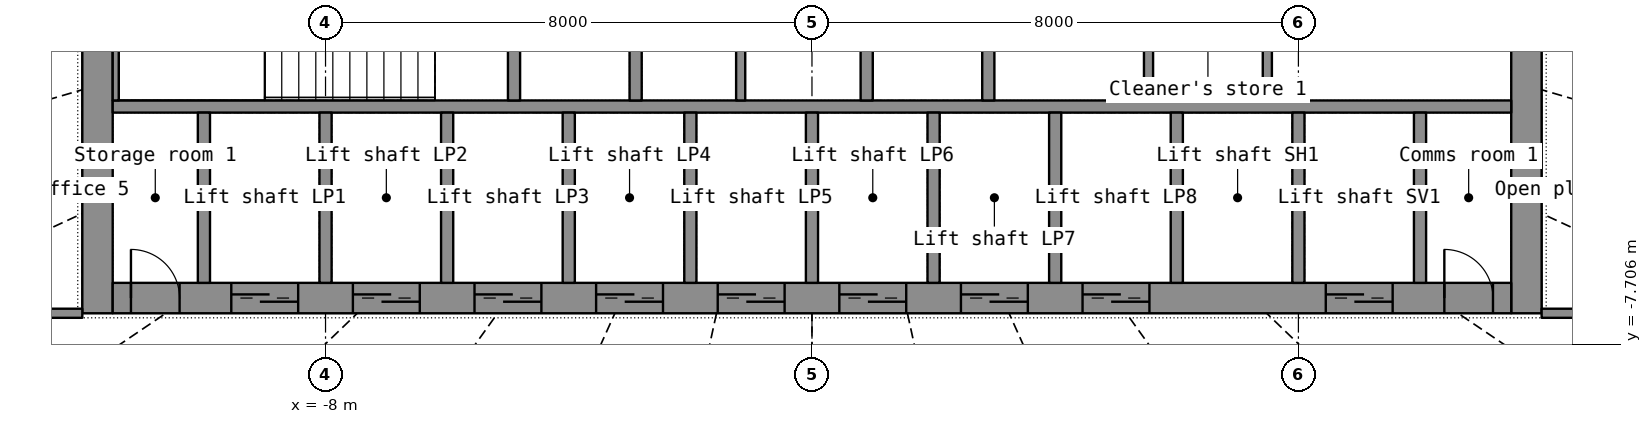
"""IFC4 building model, lengths in metres.
Left out: names, types, materials, properties, quantities, classifications, styles, units other than length and angle.
Written with IfcOpenShell. Run it as: python <this file> out.ifc"""

import sys

from ifc_helpers import new_model, si_unit, direction, frame, frame_2d, origin, place, context, subcontext, project, spatial, rectangle, extrude, element, fill, save


model = new_model("IFC4")
c1 = context("Model", 3, precision=1e-05, world=origin(), true_north=direction((0.0, 1.0)))
c2 = subcontext(c1, "Body", "Model", "MODEL_VIEW")
j1 = project(units=[si_unit("LENGTHUNIT", "METRE"), si_unit("PLANEANGLEUNIT", "RADIAN")], contexts=[c1])
p1 = place(None, origin())
s1 = spatial("IfcSite", under=j1, at=p1, CompositionType="ELEMENT")
p2 = place(p1, origin())
s2 = spatial("IfcBuilding", under=s1, at=p2, CompositionType="ELEMENT")
p3 = place(p2, frame((0.0, 0.0, 100.8)))
s3 = spatial("IfcBuildingStorey", under=s2, at=p3, CompositionType="ELEMENT", Elevation=100.8)
p4 = place(p3, frame((-11.75, -7.2, 0.0), z_axis=(0.0, 0.0, 1.0), x_axis=(0.0, 1.0, 0.0)))
e1 = element("IfcWall", 1, at=p4, inside=s3, PredefinedType="SHEAR", context=c2, shape_type="SweptSolid", body=[
    extrude(rectangle(XDim=14.4, YDim=0.5, at=frame_2d((7.2, 0.0))), origin(), (0.0, 0.0, 1.0), 3.3),
])
p5 = place(p4, frame((6.5, 0.0, 0.0)))
e2 = element("IfcOpeningElement", 2, at=p5, cuts=e1, PredefinedType="OPENING", context=c2, shape_type="SweptSolid", body=[
    extrude(rectangle(XDim=1.4, YDim=2.2, at=frame_2d((0.7, 1.1))), frame((0.0, 0.26, 0.0), z_axis=(0.0, -1.0, 0.0), x_axis=(1.0, 0.0, 0.0)), (0.0, 0.0, 1.0), 0.52),
])
p6 = place(p3, frame((11.75, -7.2, 0.0), z_axis=(0.0, 0.0, 1.0), x_axis=(0.0, 1.0, 0.0)))
e3 = element("IfcWall", 3, at=p6, inside=s3, PredefinedType="SHEAR", context=c2, shape_type="SweptSolid", body=[
    extrude(rectangle(XDim=14.4, YDim=0.5, at=frame_2d((7.2, 0.0))), origin(), (0.0, 0.0, 1.0), 3.3),
])
p7 = place(p6, frame((6.5, 0.0, 0.0)))
e4 = element("IfcOpeningElement", 4, at=p7, cuts=e3, PredefinedType="OPENING", context=c2, shape_type="SweptSolid", body=[
    extrude(rectangle(XDim=1.4, YDim=2.2, at=frame_2d((0.7, 1.1))), frame((0.0, 0.26, 0.0), z_axis=(0.0, -1.0, 0.0), x_axis=(1.0, 0.0, 0.0)), (0.0, 0.0, 1.0), 0.52),
])
p8 = place(p3, frame((-11.5, -6.95, 0.0), z_axis=(0.0, 0.0, 1.0), x_axis=(1.0, 0.0, 0.0)))
e5 = element("IfcWall", 5, at=p8, inside=s3, PredefinedType="SHEAR", context=c2, shape_type="SweptSolid", body=[
    extrude(rectangle(XDim=23.0, YDim=0.5, at=frame_2d((11.5, 0.0))), origin(), (0.0, 0.0, 1.0), 3.3),
])
p9 = place(p8, frame((1.95, 0.0, 0.0)))
e6 = element("IfcOpeningElement", 6, at=p9, cuts=e5, PredefinedType="OPENING", context=c2, shape_type="SweptSolid", body=[
    extrude(rectangle(XDim=1.1, YDim=2.2, at=frame_2d((0.55, 1.1))), frame((0.0, 0.26, 0.0), z_axis=(0.0, -1.0, 0.0), x_axis=(1.0, 0.0, 0.0)), (0.0, 0.0, 1.0), 0.52),
])
p10 = place(p8, frame((3.95, 0.0, 0.0)))
e7 = element("IfcOpeningElement", 7, at=p10, cuts=e5, PredefinedType="OPENING", context=c2, shape_type="SweptSolid", body=[
    extrude(rectangle(XDim=1.1, YDim=2.2, at=frame_2d((0.55, 1.1))), frame((0.0, 0.26, 0.0), z_axis=(0.0, -1.0, 0.0), x_axis=(1.0, 0.0, 0.0)), (0.0, 0.0, 1.0), 0.52),
])
p11 = place(p8, frame((5.95, 0.0, 0.0)))
e8 = element("IfcOpeningElement", 8, at=p11, cuts=e5, PredefinedType="OPENING", context=c2, shape_type="SweptSolid", body=[
    extrude(rectangle(XDim=1.1, YDim=2.2, at=frame_2d((0.55, 1.1))), frame((0.0, 0.26, 0.0), z_axis=(0.0, -1.0, 0.0), x_axis=(1.0, 0.0, 0.0)), (0.0, 0.0, 1.0), 0.52),
])
p12 = place(p8, frame((7.95, 0.0, 0.0)))
e9 = element("IfcOpeningElement", 9, at=p12, cuts=e5, PredefinedType="OPENING", context=c2, shape_type="SweptSolid", body=[
    extrude(rectangle(XDim=1.1, YDim=2.2, at=frame_2d((0.55, 1.1))), frame((0.0, 0.26, 0.0), z_axis=(0.0, -1.0, 0.0), x_axis=(1.0, 0.0, 0.0)), (0.0, 0.0, 1.0), 0.52),
])
p13 = place(p8, frame((9.95, 0.0, 0.0)))
e10 = element("IfcOpeningElement", 10, at=p13, cuts=e5, PredefinedType="OPENING", context=c2, shape_type="SweptSolid", body=[
    extrude(rectangle(XDim=1.1, YDim=2.2, at=frame_2d((0.55, 1.1))), frame((0.0, 0.26, 0.0), z_axis=(0.0, -1.0, 0.0), x_axis=(1.0, 0.0, 0.0)), (0.0, 0.0, 1.0), 0.52),
])
p14 = place(p8, frame((11.95, 0.0, 0.0)))
e11 = element("IfcOpeningElement", 11, at=p14, cuts=e5, PredefinedType="OPENING", context=c2, shape_type="SweptSolid", body=[
    extrude(rectangle(XDim=1.1, YDim=2.2, at=frame_2d((0.55, 1.1))), frame((0.0, 0.26, 0.0), z_axis=(0.0, -1.0, 0.0), x_axis=(1.0, 0.0, 0.0)), (0.0, 0.0, 1.0), 0.52),
])
p15 = place(p8, frame((13.95, 0.0, 0.0)))
e12 = element("IfcOpeningElement", 12, at=p15, cuts=e5, PredefinedType="OPENING", context=c2, shape_type="SweptSolid", body=[
    extrude(rectangle(XDim=1.1, YDim=2.2, at=frame_2d((0.55, 1.1))), frame((0.0, 0.26, 0.0), z_axis=(0.0, -1.0, 0.0), x_axis=(1.0, 0.0, 0.0)), (0.0, 0.0, 1.0), 0.52),
])
p16 = place(p8, frame((15.95, 0.0, 0.0)))
e13 = element("IfcOpeningElement", 13, at=p16, cuts=e5, PredefinedType="OPENING", context=c2, shape_type="SweptSolid", body=[
    extrude(rectangle(XDim=1.1, YDim=2.2, at=frame_2d((0.55, 1.1))), frame((0.0, 0.26, 0.0), z_axis=(0.0, -1.0, 0.0), x_axis=(1.0, 0.0, 0.0)), (0.0, 0.0, 1.0), 0.52),
])
p17 = place(p8, frame((19.95, 0.0, 0.0)))
e14 = element("IfcOpeningElement", 14, at=p17, cuts=e5, PredefinedType="OPENING", context=c2, shape_type="SweptSolid", body=[
    extrude(rectangle(XDim=1.1, YDim=2.2, at=frame_2d((0.55, 1.1))), frame((0.0, 0.26, 0.0), z_axis=(0.0, -1.0, 0.0), x_axis=(1.0, 0.0, 0.0)), (0.0, 0.0, 1.0), 0.52),
])
p18 = place(p8, frame((0.3, 0.0, 0.0)))
e15 = element("IfcOpeningElement", 15, at=p18, cuts=e5, PredefinedType="OPENING", context=c2, shape_type="SweptSolid", body=[
    extrude(rectangle(XDim=0.8, YDim=2.05, at=frame_2d((0.4, 1.025))), frame((0.0, 0.26, 0.0), z_axis=(0.0, -1.0, 0.0), x_axis=(1.0, 0.0, 0.0)), (0.0, 0.0, 1.0), 0.52),
])
p19 = place(p8, frame((21.9, 0.0, 0.0)))
e16 = element("IfcOpeningElement", 16, at=p19, cuts=e5, PredefinedType="OPENING", context=c2, shape_type="SweptSolid", body=[
    extrude(rectangle(XDim=0.8, YDim=2.05, at=frame_2d((0.4, 1.025))), frame((0.0, 0.26, 0.0), z_axis=(0.0, -1.0, 0.0), x_axis=(1.0, 0.0, 0.0)), (0.0, 0.0, 1.0), 0.52),
])
p20 = place(p3, frame((-11.5, -3.8, 0.0), z_axis=(0.0, 0.0, 1.0), x_axis=(1.0, 0.0, 0.0)))
e17 = element("IfcWall", 17, at=p20, inside=s3, PredefinedType="SHEAR", context=c2, shape_type="SweptSolid", body=[
    extrude(rectangle(XDim=23.0, YDim=0.2, at=frame_2d((11.5, 0.0))), origin(), (0.0, 0.0, 1.0), 3.3),
])
for number, where, z_axis, x_axis in (
    (18, (-10.0, -6.7, 0.0), (0.0, 0.0, 1.0), (0.0, 1.0, 0.0)),
    (19, (-8.0, -6.7, 0.0), (0.0, 0.0, 1.0), (0.0, 1.0, 0.0)),
    (20, (-6.0, -6.7, 0.0), (0.0, 0.0, 1.0), (0.0, 1.0, 0.0)),
    (21, (-4.0, -6.7, 0.0), (0.0, 0.0, 1.0), (0.0, 1.0, 0.0)),
    (22, (-2.0, -6.7, 0.0), (0.0, 0.0, 1.0), (0.0, 1.0, 0.0)),
    (23, (0.0, -6.7, 0.0), (0.0, 0.0, 1.0), (0.0, 1.0, 0.0)),
    (24, (2.0, -6.7, 0.0), (0.0, 0.0, 1.0), (0.0, 1.0, 0.0)),
    (25, (4.0, -6.7, 0.0), (0.0, 0.0, 1.0), (0.0, 1.0, 0.0)),
    (26, (6.0, -6.7, 0.0), (0.0, 0.0, 1.0), (0.0, 1.0, 0.0)),
    (27, (8.0, -6.7, 0.0), (0.0, 0.0, 1.0), (0.0, 1.0, 0.0)),
    (28, (10.0, -6.7, 0.0), (0.0, 0.0, 1.0), (0.0, 1.0, 0.0)),
):
    element("IfcWall", number, at=place(p3, frame(where, z_axis=z_axis, x_axis=x_axis)), inside=s3, PredefinedType="SHEAR", context=c2, shape_type="SweptSolid", body=[
        extrude(rectangle(XDim=2.8, YDim=0.2, at=frame_2d((1.4, 0.0))), origin(), (0.0, 0.0, 1.0), 3.3),
    ])
p21 = place(p3, frame((-2.9, -3.7, 0.0), z_axis=(0.0, 0.0, 1.0), x_axis=(0.0, 1.0, 0.0)))
e29 = element("IfcWall", 29, at=p21, inside=s3, PredefinedType="SHEAR", context=c2, shape_type="SweptSolid", body=[
    extrude(rectangle(XDim=7.4, YDim=0.2, at=frame_2d((3.7, 0.0))), origin(), (0.0, 0.0, 1.0), 3.3),
])
p22 = place(p21, frame((3.1, 0.0, 0.0)))
e30 = element("IfcOpeningElement", 30, at=p22, cuts=e29, PredefinedType="OPENING", context=c2, shape_type="SweptSolid", body=[
    extrude(rectangle(XDim=1.2, YDim=2.2, at=frame_2d((0.6, 1.1))), frame((0.0, 0.11, 0.0), z_axis=(0.0, -1.0, 0.0), x_axis=(1.0, 0.0, 0.0)), (0.0, 0.0, 1.0), 0.22),
])
p23 = place(p3, frame((2.9, -3.7, 0.0), z_axis=(0.0, 0.0, 1.0), x_axis=(0.0, 1.0, 0.0)))
e31 = element("IfcWall", 31, at=p23, inside=s3, PredefinedType="SHEAR", context=c2, shape_type="SweptSolid", body=[
    extrude(rectangle(XDim=7.4, YDim=0.2, at=frame_2d((3.7, 0.0))), origin(), (0.0, 0.0, 1.0), 3.3),
])
p24 = place(p23, frame((3.1, 0.0, 0.0)))
e32 = element("IfcOpeningElement", 32, at=p24, cuts=e31, PredefinedType="OPENING", context=c2, shape_type="SweptSolid", body=[
    extrude(rectangle(XDim=1.2, YDim=2.2, at=frame_2d((0.6, 1.1))), frame((0.0, 0.11, 0.0), z_axis=(0.0, -1.0, 0.0), x_axis=(1.0, 0.0, 0.0)), (0.0, 0.0, 1.0), 0.22),
])
p25 = place(p3, frame((0.9, -3.7, 0.0), z_axis=(0.0, 0.0, 1.0), x_axis=(0.0, 1.0, 0.0)))
e33 = element("IfcWall", 33, at=p25, inside=s3, PredefinedType="SHEAR", context=c2, shape_type="SweptSolid", body=[
    extrude(rectangle(XDim=2.35, YDim=0.2, at=frame_2d((1.175, 0.0))), origin(), (0.0, 0.0, 1.0), 3.3),
])
p26 = place(p3, frame((-11.45, -3.7, 0.0), z_axis=(0.0, 0.0, 1.0), x_axis=(0.0, 1.0, 0.0)))
e34 = element("IfcWall", 34, at=p26, inside=s3, PredefinedType="SHEAR", context=c2, shape_type="SweptSolid", body=[
    extrude(rectangle(XDim=2.35, YDim=0.1, at=frame_2d((1.175, 0.0))), origin(), (0.0, 0.0, 1.0), 3.3),
])
p27 = place(p3, frame((-4.9, -3.7, 0.0), z_axis=(0.0, 0.0, 1.0), x_axis=(0.0, 1.0, 0.0)))
e35 = element("IfcWall", 35, at=p27, inside=s3, PredefinedType="SHEAR", context=c2, shape_type="SweptSolid", body=[
    extrude(rectangle(XDim=2.35, YDim=0.2, at=frame_2d((1.175, 0.0))), origin(), (0.0, 0.0, 1.0), 3.3),
])
for number, where, z_axis, x_axis in (
    (36, (5.535, -3.7, 0.0), (0.0, 0.0, 1.0), (0.0, 1.0, 0.0)),
    (37, (7.489, -3.7, 0.0), (0.0, 0.0, 1.0), (0.0, 1.0, 0.0)),
    (38, (-1.173, -3.7, 0.0), (0.0, 0.0, 1.0), (0.0, 1.0, 0.0)),
):
    element("IfcWall", number, at=place(p3, frame(where, z_axis=z_axis, x_axis=x_axis)), inside=s3, PredefinedType="PARTITIONING", context=c2, shape_type="SweptSolid", body=[
        extrude(rectangle(XDim=2.35, YDim=0.15, at=frame_2d((1.175, 0.0))), origin(), (0.0, 0.0, 1.0), 3.3),
    ])
for number, where, z_axis, x_axis in (
    (39, (-12.0, -7.2, 0.0), (0.0, 0.0, 1.0), (-1.0, 0.0, 0.0)),
    (40, (15.923, -7.2, 0.0), (0.0, 0.0, 1.0), (-1.0, 0.0, 0.0)),
):
    element("IfcWall", number, at=place(p3, frame(where, z_axis=z_axis, x_axis=x_axis)), inside=s3, PredefinedType="PARTITIONING", context=c2, shape_type="SweptSolid", body=[
        extrude(rectangle(XDim=3.923, YDim=0.15, at=frame_2d((1.961, 0.0))), origin(), (0.0, 0.0, 1.0), 2.4),
    ])
p28 = place(p9, origin())
e41 = element("IfcDoor", 41, at=p28, inside=s3, OperationType="DOUBLE_DOOR_SLIDING", PredefinedType="DOOR", context=c2, shape_type="SweptSolid", body=[
    extrude(rectangle(XDim=1.1, YDim=2.2, at=frame_2d((0.55, 1.1))), frame((0.0, 0.025, 0.0), z_axis=(0.0, -1.0, 0.0), x_axis=(1.0, 0.0, 0.0)), (0.0, 0.0, 1.0), 0.05),
])
fill(e6, e41)
p29 = place(p10, origin())
e42 = element("IfcDoor", 42, at=p29, inside=s3, OperationType="DOUBLE_DOOR_SLIDING", PredefinedType="DOOR", context=c2, shape_type="SweptSolid", body=[
    extrude(rectangle(XDim=1.1, YDim=2.2, at=frame_2d((0.55, 1.1))), frame((0.0, 0.025, 0.0), z_axis=(0.0, -1.0, 0.0), x_axis=(1.0, 0.0, 0.0)), (0.0, 0.0, 1.0), 0.05),
])
fill(e7, e42)
p30 = place(p11, origin())
e43 = element("IfcDoor", 43, at=p30, inside=s3, OperationType="DOUBLE_DOOR_SLIDING", PredefinedType="DOOR", context=c2, shape_type="SweptSolid", body=[
    extrude(rectangle(XDim=1.1, YDim=2.2, at=frame_2d((0.55, 1.1))), frame((0.0, 0.025, 0.0), z_axis=(0.0, -1.0, 0.0), x_axis=(1.0, 0.0, 0.0)), (0.0, 0.0, 1.0), 0.05),
])
fill(e8, e43)
p31 = place(p12, origin())
e44 = element("IfcDoor", 44, at=p31, inside=s3, OperationType="DOUBLE_DOOR_SLIDING", PredefinedType="DOOR", context=c2, shape_type="SweptSolid", body=[
    extrude(rectangle(XDim=1.1, YDim=2.2, at=frame_2d((0.55, 1.1))), frame((0.0, 0.025, 0.0), z_axis=(0.0, -1.0, 0.0), x_axis=(1.0, 0.0, 0.0)), (0.0, 0.0, 1.0), 0.05),
])
fill(e9, e44)
p32 = place(p13, origin())
e45 = element("IfcDoor", 45, at=p32, inside=s3, OperationType="DOUBLE_DOOR_SLIDING", PredefinedType="DOOR", context=c2, shape_type="SweptSolid", body=[
    extrude(rectangle(XDim=1.1, YDim=2.2, at=frame_2d((0.55, 1.1))), frame((0.0, 0.025, 0.0), z_axis=(0.0, -1.0, 0.0), x_axis=(1.0, 0.0, 0.0)), (0.0, 0.0, 1.0), 0.05),
])
fill(e10, e45)
p33 = place(p14, origin())
e46 = element("IfcDoor", 46, at=p33, inside=s3, OperationType="DOUBLE_DOOR_SLIDING", PredefinedType="DOOR", context=c2, shape_type="SweptSolid", body=[
    extrude(rectangle(XDim=1.1, YDim=2.2, at=frame_2d((0.55, 1.1))), frame((0.0, 0.025, 0.0), z_axis=(0.0, -1.0, 0.0), x_axis=(1.0, 0.0, 0.0)), (0.0, 0.0, 1.0), 0.05),
])
fill(e11, e46)
p34 = place(p15, origin())
e47 = element("IfcDoor", 47, at=p34, inside=s3, OperationType="DOUBLE_DOOR_SLIDING", PredefinedType="DOOR", context=c2, shape_type="SweptSolid", body=[
    extrude(rectangle(XDim=1.1, YDim=2.2, at=frame_2d((0.55, 1.1))), frame((0.0, 0.025, 0.0), z_axis=(0.0, -1.0, 0.0), x_axis=(1.0, 0.0, 0.0)), (0.0, 0.0, 1.0), 0.05),
])
fill(e12, e47)
p35 = place(p16, origin())
e48 = element("IfcDoor", 48, at=p35, inside=s3, OperationType="DOUBLE_DOOR_SLIDING", PredefinedType="DOOR", context=c2, shape_type="SweptSolid", body=[
    extrude(rectangle(XDim=1.1, YDim=2.2, at=frame_2d((0.55, 1.1))), frame((0.0, 0.025, 0.0), z_axis=(0.0, -1.0, 0.0), x_axis=(1.0, 0.0, 0.0)), (0.0, 0.0, 1.0), 0.05),
])
fill(e13, e48)
p36 = place(p17, origin())
e49 = element("IfcDoor", 49, at=p36, inside=s3, OperationType="DOUBLE_DOOR_SLIDING", PredefinedType="DOOR", context=c2, shape_type="SweptSolid", body=[
    extrude(rectangle(XDim=1.1, YDim=2.2, at=frame_2d((0.55, 1.1))), frame((0.0, 0.025, 0.0), z_axis=(0.0, -1.0, 0.0), x_axis=(1.0, 0.0, 0.0)), (0.0, 0.0, 1.0), 0.05),
])
fill(e14, e49)
p37 = place(p18, origin())
e50 = element("IfcDoor", 50, at=p37, inside=s3, OperationType="SINGLE_SWING_LEFT", PredefinedType="DOOR", context=c2, shape_type="SweptSolid", body=[
    extrude(rectangle(XDim=0.8, YDim=2.05, at=frame_2d((0.4, 1.025))), frame((0.0, 0.025, 0.0), z_axis=(0.0, -1.0, 0.0), x_axis=(1.0, 0.0, 0.0)), (0.0, 0.0, 1.0), 0.05),
])
fill(e15, e50)
p38 = place(p19, origin())
e51 = element("IfcDoor", 51, at=p38, inside=s3, OperationType="SINGLE_SWING_LEFT", PredefinedType="DOOR", context=c2, shape_type="SweptSolid", body=[
    extrude(rectangle(XDim=0.8, YDim=2.05, at=frame_2d((0.4, 1.025))), frame((0.0, 0.025, 0.0), z_axis=(0.0, -1.0, 0.0), x_axis=(1.0, 0.0, 0.0)), (0.0, 0.0, 1.0), 0.05),
])
fill(e16, e51)
save(model, sys.argv[1])
